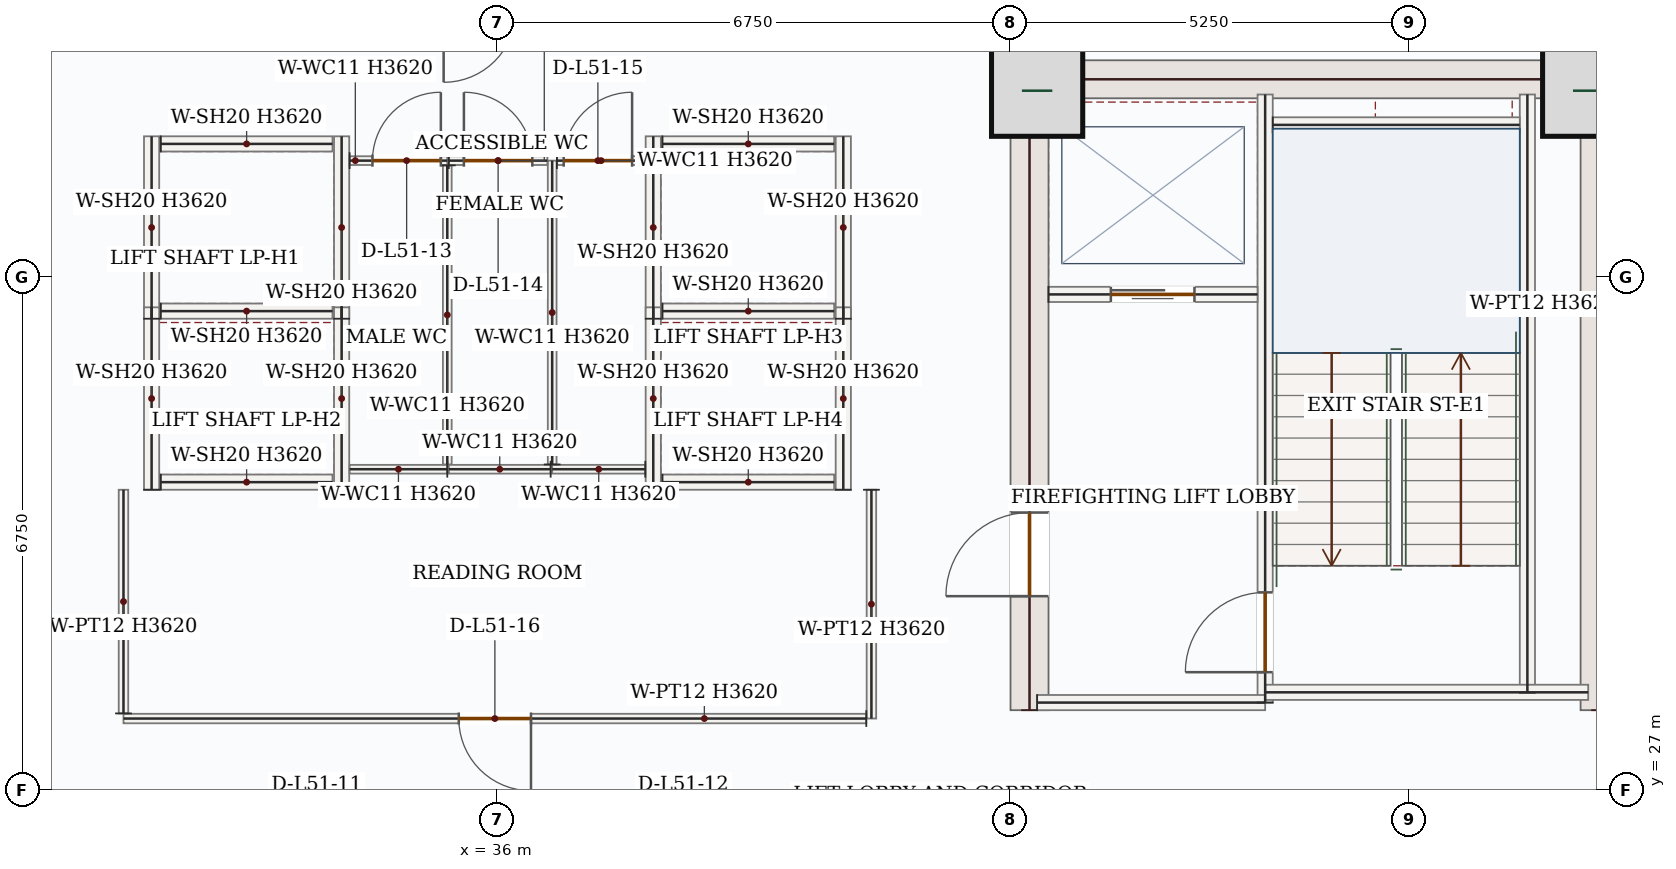
"""IFC4 building model, lengths in metres.
Left out: names, types, materials, properties, quantities, classifications, styles, units other than length and angle.
Written with IfcOpenShell. Run it as: python <this file> out.ifc"""

import sys

from ifc_helpers import new_model, si_unit, direction, frame, frame_2d, origin, origin_2d, place, context, subcontext, project, spatial, rectangle, extrude, source, transform, mapped, element, fill, save


model = new_model("IFC4")
c1 = context("Model", 3, precision=1e-05, world=origin(), true_north=direction((0.0, 1.0)))
c2 = subcontext(c1, "Body", "Model", "MODEL_VIEW")
j1 = project(units=[si_unit("LENGTHUNIT", "METRE"), si_unit("PLANEANGLEUNIT", "RADIAN")], contexts=[c1])
p1 = place(None, origin())
s1 = spatial("IfcSite", under=j1, at=p1, CompositionType="ELEMENT")
p2 = place(p1, origin())
s2 = spatial("IfcBuilding", under=s1, at=p2, CompositionType="ELEMENT")
p3 = place(p2, frame((0.0, 0.0, 217.5)))
s3 = spatial("IfcBuildingStorey", under=s2, at=p3, CompositionType="ELEMENT", Elevation=217.5)
p4 = place(p3, frame((43.0, 28.05, 0.0), z_axis=(0.0, 0.0, 1.0), x_axis=(0.0, 1.0, 0.0)))
e1 = element("IfcWall", 1, at=p4, inside=s3, PredefinedType="SHEAR", context=c2, shape_type="SweptSolid", body=[
    extrude(rectangle(XDim=8.55, YDim=0.5, at=frame_2d((4.275, 0.0))), origin(), (0.0, 0.0, 1.0), 3.62),
])
p5 = place(p4, frame((1.5, 0.0, 0.0)))
e2 = element("IfcOpeningElement", 2, at=p5, cuts=e1, PredefinedType="OPENING", context=c2, shape_type="SweptSolid", body=[
    extrude(rectangle(XDim=1.1, YDim=2.2, at=frame_2d((0.55, 1.1))), frame((0.0, 0.26, 0.0), z_axis=(0.0, -1.0, 0.0), x_axis=(1.0, 0.0, 0.0)), (0.0, 0.0, 1.0), 0.52),
])
m1 = source(origin(), c2, "Body", "SweptSolid", [
    extrude(rectangle(XDim=8.55, YDim=0.5, at=frame_2d((4.275, 0.0))), origin(), (0.0, 0.0, 1.0), 3.62),
])
p6 = place(p3, frame((50.5, 28.05, 0.0), z_axis=(0.0, 0.0, 1.0), x_axis=(0.0, 1.0, 0.0)))
e3 = element("IfcWall", 3, at=p6, inside=s3, PredefinedType="SHEAR", context=c2, shape_type="MappedRepresentation", body=[
    mapped(m1, transform((0.0, 0.0, 0.0), x_axis=(1.0, 0.0, 0.0), y_axis=(0.0, 1.0, 0.0), z_axis=(0.0, 0.0, 1.0), scale=1.0)),
])
m2 = source(origin(), c2, "Body", "SweptSolid", [
    extrude(rectangle(XDim=7.0, YDim=0.5, at=frame_2d((3.5, 0.0))), origin(), (0.0, 0.0, 1.0), 3.62),
])
p7 = place(p3, frame((43.25, 36.35, 0.0), z_axis=(0.0, 0.0, 1.0), x_axis=(1.0, 0.0, 0.0)))
e4 = element("IfcWall", 4, at=p7, inside=s3, PredefinedType="SHEAR", context=c2, shape_type="MappedRepresentation", body=[
    mapped(m2, transform((0.0, 0.0, 0.0), x_axis=(1.0, 0.0, 0.0), y_axis=(0.0, 1.0, 0.0), z_axis=(0.0, 0.0, 1.0), scale=1.0)),
])
m3 = source(origin(), c2, "Body", "SweptSolid", [
    extrude(rectangle(XDim=1.2, YDim=1.2, at=origin_2d()), origin(), (0.0, 0.0, 1.0), 3.9),
])
for number, where, z_axis, x_axis in (
    (5, (43.1, 36.2, 0.0), (0.0, 0.0, 1.0), (1.0, 0.0, 0.0)),
    (6, (50.35, 36.2, 0.0), (0.0, 0.0, 1.0), (1.0, 0.0, 0.0)),
):
    element("IfcColumn", number, at=place(p3, frame(where, z_axis=z_axis, x_axis=x_axis)), inside=s3, PredefinedType="COLUMN", context=c2, shape_type="MappedRepresentation", body=[
        mapped(m3, transform((0.0, 0.0, 0.0), x_axis=(1.0, 0.0, 0.0), y_axis=(0.0, 1.0, 0.0), z_axis=(0.0, 0.0, 1.0), scale=1.0)),
    ])
m4 = source(origin(), c2, "Body", "SweptSolid", [
    extrude(rectangle(XDim=7.87, YDim=0.2, at=frame_2d((3.935, 0.0))), origin(), (0.0, 0.0, 1.0), 3.62),
])
p8 = place(p3, frame((49.55, 28.28, 0.0), z_axis=(0.0, 0.0, 1.0), x_axis=(0.0, 1.0, 0.0)))
e7 = element("IfcWall", 7, at=p8, inside=s3, PredefinedType="SOLIDWALL", context=c2, shape_type="MappedRepresentation", body=[
    mapped(m4, transform((0.0, 0.0, 0.0), x_axis=(1.0, 0.0, 0.0), y_axis=(0.0, 1.0, 0.0), z_axis=(0.0, 0.0, 1.0), scale=1.0)),
])
p9 = place(p3, frame((46.1, 28.15, 0.0), z_axis=(0.0, 0.0, 1.0), x_axis=(0.0, 1.0, 0.0)))
e8 = element("IfcWall", 8, at=p9, inside=s3, PredefinedType="SOLIDWALL", context=c2, shape_type="SweptSolid", body=[
    extrude(rectangle(XDim=8.0, YDim=0.2, at=frame_2d((4.0, 0.0))), origin(), (0.0, 0.0, 1.0), 3.62),
])
p10 = place(p9, frame((0.4, 0.0, 0.0)))
e9 = element("IfcOpeningElement", 9, at=p10, cuts=e8, PredefinedType="OPENING", context=c2, shape_type="SweptSolid", body=[
    extrude(rectangle(XDim=1.05, YDim=2.15, at=frame_2d((0.525, 1.075))), frame((0.0, 0.11, 0.0), z_axis=(0.0, -1.0, 0.0), x_axis=(1.0, 0.0, 0.0)), (0.0, 0.0, 1.0), 0.22),
])
m5 = source(origin(), c2, "Body", "SweptSolid", [
    extrude(rectangle(XDim=3.0, YDim=0.2, at=frame_2d((1.5, 0.0))), origin(), (0.0, 0.0, 1.0), 3.62),
])
p11 = place(p3, frame((43.1, 28.15, 0.0), z_axis=(0.0, 0.0, 1.0), x_axis=(1.0, 0.0, 0.0)))
e10 = element("IfcWall", 10, at=p11, inside=s3, PredefinedType="SOLIDWALL", context=c2, shape_type="MappedRepresentation", body=[
    mapped(m5, transform((0.0, 0.0, 0.0), x_axis=(1.0, 0.0, 0.0), y_axis=(0.0, 1.0, 0.0), z_axis=(0.0, 0.0, 1.0), scale=1.0)),
])
m6 = source(origin(), c2, "Body", "SweptSolid", [
    extrude(rectangle(XDim=4.25, YDim=0.2, at=frame_2d((2.125, 0.0))), origin(), (0.0, 0.0, 1.0), 3.62),
])
p12 = place(p3, frame((46.1, 28.285, 0.0), z_axis=(0.0, 0.0, 1.0), x_axis=(1.0, 0.0, 0.0)))
e11 = element("IfcWall", 11, at=p12, inside=s3, PredefinedType="SOLIDWALL", context=c2, shape_type="MappedRepresentation", body=[
    mapped(m6, transform((0.0, 0.0, 0.0), x_axis=(1.0, 0.0, 0.0), y_axis=(0.0, 1.0, 0.0), z_axis=(0.0, 0.0, 1.0), scale=1.0)),
])
m7 = source(origin(), c2, "Body", "SweptSolid", [
    extrude(rectangle(XDim=3.25, YDim=0.2, at=frame_2d((1.625, 0.0))), origin(), (0.0, 0.0, 1.0), 3.62),
])
p13 = place(p3, frame((46.2, 35.75, 0.0), z_axis=(0.0, 0.0, 1.0), x_axis=(1.0, 0.0, 0.0)))
e12 = element("IfcWall", 12, at=p13, inside=s3, PredefinedType="SOLIDWALL", context=c2, shape_type="MappedRepresentation", body=[
    mapped(m7, transform((0.0, 0.0, 0.0), x_axis=(1.0, 0.0, 0.0), y_axis=(0.0, 1.0, 0.0), z_axis=(0.0, 0.0, 1.0), scale=1.0)),
])
p14 = place(p3, frame((43.25, 33.52, 0.0), z_axis=(0.0, 0.0, 1.0), x_axis=(1.0, 0.0, 0.0)))
e13 = element("IfcWall", 13, at=p14, inside=s3, PredefinedType="SOLIDWALL", context=c2, shape_type="SweptSolid", body=[
    extrude(rectangle(XDim=2.75, YDim=0.2, at=frame_2d((1.375, 0.0))), origin(), (0.0, 0.0, 1.0), 3.62),
])
p15 = place(p14, frame((0.82, 0.0, 0.0)))
e14 = element("IfcOpeningElement", 14, at=p15, cuts=e13, PredefinedType="OPENING", context=c2, shape_type="SweptSolid", body=[
    extrude(rectangle(XDim=1.1, YDim=2.15, at=frame_2d((0.55, 1.075))), frame((0.0, 0.11, 0.0), z_axis=(0.0, -1.0, 0.0), x_axis=(1.0, 0.0, 0.0)), (0.0, 0.0, 1.0), 0.22),
])
m8 = source(origin(), c2, "Body", "SweptSolid", [
    extrude(rectangle(XDim=2.4, YDim=0.2, at=frame_2d((1.2, 0.0))), origin(), (0.0, 0.0, 1.0), 3.62),
])
for number, where, z_axis, x_axis in (
    (15, (31.45, 33.2, 0.0), (0.0, 0.0, 1.0), (0.0, 1.0, 0.0)),
    (16, (33.95, 33.2, 0.0), (0.0, 0.0, 1.0), (0.0, 1.0, 0.0)),
):
    element("IfcWall", number, at=place(p3, frame(where, z_axis=z_axis, x_axis=x_axis)), inside=s3, PredefinedType="SOLIDWALL", context=c2, shape_type="MappedRepresentation", body=[
        mapped(m8, transform((0.0, 0.0, 0.0), x_axis=(1.0, 0.0, 0.0), y_axis=(0.0, 1.0, 0.0), z_axis=(0.0, 0.0, 1.0), scale=1.0)),
    ])
m9 = source(origin(), c2, "Body", "SweptSolid", [
    extrude(rectangle(XDim=2.26, YDim=0.2, at=frame_2d((1.13, 0.0))), origin(), (0.0, 0.0, 1.0), 3.62),
])
for number, where, z_axis, x_axis in (
    (17, (31.57, 33.3, 0.0), (0.0, 0.0, 1.0), (1.0, 0.0, 0.0)),
    (18, (31.57, 35.5, 0.0), (0.0, 0.0, 1.0), (1.0, 0.0, 0.0)),
):
    element("IfcWall", number, at=place(p3, frame(where, z_axis=z_axis, x_axis=x_axis)), inside=s3, PredefinedType="SOLIDWALL", context=c2, shape_type="MappedRepresentation", body=[
        mapped(m9, transform((0.0, 0.0, 0.0), x_axis=(1.0, 0.0, 0.0), y_axis=(0.0, 1.0, 0.0), z_axis=(0.0, 0.0, 1.0), scale=1.0)),
    ])
for number, where, z_axis, x_axis in (
    (19, (31.45, 30.95, 0.0), (0.0, 0.0, 1.0), (0.0, 1.0, 0.0)),
    (20, (33.95, 30.95, 0.0), (0.0, 0.0, 1.0), (0.0, 1.0, 0.0)),
):
    element("IfcWall", number, at=place(p3, frame(where, z_axis=z_axis, x_axis=x_axis)), inside=s3, PredefinedType="SOLIDWALL", context=c2, shape_type="MappedRepresentation", body=[
        mapped(m8, transform((0.0, 0.0, 0.0), x_axis=(1.0, 0.0, 0.0), y_axis=(0.0, 1.0, 0.0), z_axis=(0.0, 0.0, 1.0), scale=1.0)),
    ])
p16 = place(p3, frame((31.57, 31.05, 0.0), z_axis=(0.0, 0.0, 1.0), x_axis=(1.0, 0.0, 0.0)))
e21 = element("IfcWall", 21, at=p16, inside=s3, PredefinedType="SOLIDWALL", context=c2, shape_type="MappedRepresentation", body=[
    mapped(m9, transform((0.0, 0.0, 0.0), x_axis=(1.0, 0.0, 0.0), y_axis=(0.0, 1.0, 0.0), z_axis=(0.0, 0.0, 1.0), scale=1.0)),
])
for number, where, z_axis, x_axis in (
    (22, (38.05, 33.2, 0.0), (0.0, 0.0, 1.0), (0.0, 1.0, 0.0)),
    (23, (40.55, 33.2, 0.0), (0.0, 0.0, 1.0), (0.0, 1.0, 0.0)),
):
    element("IfcWall", number, at=place(p3, frame(where, z_axis=z_axis, x_axis=x_axis)), inside=s3, PredefinedType="SOLIDWALL", context=c2, shape_type="MappedRepresentation", body=[
        mapped(m8, transform((0.0, 0.0, 0.0), x_axis=(1.0, 0.0, 0.0), y_axis=(0.0, 1.0, 0.0), z_axis=(0.0, 0.0, 1.0), scale=1.0)),
    ])
for number, where, z_axis, x_axis in (
    (24, (38.17, 33.3, 0.0), (0.0, 0.0, 1.0), (1.0, 0.0, 0.0)),
    (25, (38.17, 35.5, 0.0), (0.0, 0.0, 1.0), (1.0, 0.0, 0.0)),
):
    element("IfcWall", number, at=place(p3, frame(where, z_axis=z_axis, x_axis=x_axis)), inside=s3, PredefinedType="SOLIDWALL", context=c2, shape_type="MappedRepresentation", body=[
        mapped(m9, transform((0.0, 0.0, 0.0), x_axis=(1.0, 0.0, 0.0), y_axis=(0.0, 1.0, 0.0), z_axis=(0.0, 0.0, 1.0), scale=1.0)),
    ])
for number, where, z_axis, x_axis in (
    (26, (38.05, 30.95, 0.0), (0.0, 0.0, 1.0), (0.0, 1.0, 0.0)),
    (27, (40.55, 30.95, 0.0), (0.0, 0.0, 1.0), (0.0, 1.0, 0.0)),
):
    element("IfcWall", number, at=place(p3, frame(where, z_axis=z_axis, x_axis=x_axis)), inside=s3, PredefinedType="SOLIDWALL", context=c2, shape_type="MappedRepresentation", body=[
        mapped(m8, transform((0.0, 0.0, 0.0), x_axis=(1.0, 0.0, 0.0), y_axis=(0.0, 1.0, 0.0), z_axis=(0.0, 0.0, 1.0), scale=1.0)),
    ])
p17 = place(p3, frame((38.17, 31.05, 0.0), z_axis=(0.0, 0.0, 1.0), x_axis=(1.0, 0.0, 0.0)))
e28 = element("IfcWall", 28, at=p17, inside=s3, PredefinedType="SOLIDWALL", context=c2, shape_type="MappedRepresentation", body=[
    mapped(m9, transform((0.0, 0.0, 0.0), x_axis=(1.0, 0.0, 0.0), y_axis=(0.0, 1.0, 0.0), z_axis=(0.0, 0.0, 1.0), scale=1.0)),
])
m10 = source(origin(), c2, "Body", "SweptSolid", [
    extrude(rectangle(XDim=1.225, YDim=0.115, at=frame_2d((0.613, 0.0))), origin(), (0.0, 0.0, 1.0), 3.62),
])
p18 = place(p3, frame((37.945, 31.22, 0.0), z_axis=(0.0, 0.0, 1.0), x_axis=(-1.0, 0.0, 0.0)))
e29 = element("IfcWall", 29, at=p18, inside=s3, PredefinedType="PARTITIONING", context=c2, shape_type="MappedRepresentation", body=[
    mapped(m10, transform((0.0, 0.0, 0.0), x_axis=(1.0, 0.0, 0.0), y_axis=(0.0, 1.0, 0.0), z_axis=(0.0, 0.0, 1.0), scale=1.0)),
])
m11 = source(origin(), c2, "Body", "SweptSolid", [
    extrude(rectangle(XDim=3.998, YDim=0.115, at=frame_2d((1.999, 0.0))), origin(), (0.0, 0.0, 1.0), 3.62),
])
p19 = place(p3, frame((36.72, 31.282, 0.0), z_axis=(0.0, 0.0, 1.0), x_axis=(0.0, 1.0, 0.0)))
e30 = element("IfcWall", 30, at=p19, inside=s3, PredefinedType="PARTITIONING", context=c2, shape_type="MappedRepresentation", body=[
    mapped(m11, transform((0.0, 0.0, 0.0), x_axis=(1.0, 0.0, 0.0), y_axis=(0.0, 1.0, 0.0), z_axis=(0.0, 0.0, 1.0), scale=1.0)),
])
p20 = place(p3, frame((36.782, 35.28, 0.0), z_axis=(0.0, 0.0, 1.0), x_axis=(1.0, 0.0, 0.0)))
e31 = element("IfcWall", 31, at=p20, inside=s3, PredefinedType="PARTITIONING", context=c2, shape_type="SweptSolid", body=[
    extrude(rectangle(XDim=1.163, YDim=0.115, at=frame_2d((0.581, 0.0))), origin(), (0.0, 0.0, 1.0), 3.62),
])
p21 = place(p20, frame((0.089, 0.0, 0.0)))
e32 = element("IfcOpeningElement", 32, at=p21, cuts=e31, PredefinedType="OPENING", context=c2, shape_type="SweptSolid", body=[
    extrude(rectangle(XDim=0.9, YDim=2.1, at=frame_2d((0.45, 1.05))), frame((0.0, 0.067, 0.0), z_axis=(0.0, -1.0, 0.0), x_axis=(1.0, 0.0, 0.0)), (0.0, 0.0, 1.0), 0.135),
])
m12 = source(origin(), c2, "Body", "SweptSolid", [
    extrude(rectangle(XDim=1.285, YDim=0.115, at=frame_2d((0.643, 0.0))), origin(), (0.0, 0.0, 1.0), 3.62),
])
p22 = place(p3, frame((35.34, 31.22, 0.0), z_axis=(0.0, 0.0, 1.0), x_axis=(-1.0, 0.0, 0.0)))
e33 = element("IfcWall", 33, at=p22, inside=s3, PredefinedType="PARTITIONING", context=c2, shape_type="MappedRepresentation", body=[
    mapped(m12, transform((0.0, 0.0, 0.0), x_axis=(1.0, 0.0, 0.0), y_axis=(0.0, 1.0, 0.0), z_axis=(0.0, 0.0, 1.0), scale=1.0)),
])
p23 = place(p3, frame((34.055, 35.28, 0.0), z_axis=(0.0, 0.0, 1.0), x_axis=(1.0, 0.0, 0.0)))
e34 = element("IfcWall", 34, at=p23, inside=s3, PredefinedType="PARTITIONING", context=c2, shape_type="SweptSolid", body=[
    extrude(rectangle(XDim=1.285, YDim=0.115, at=frame_2d((0.643, 0.0))), origin(), (0.0, 0.0, 1.0), 3.62),
])
p24 = place(p23, frame((0.3, 0.0, 0.0)))
e35 = element("IfcOpeningElement", 35, at=p24, cuts=e34, PredefinedType="OPENING", context=c2, shape_type="SweptSolid", body=[
    extrude(rectangle(XDim=0.9, YDim=2.1, at=frame_2d((0.45, 1.05))), frame((0.0, 0.067, 0.0), z_axis=(0.0, -1.0, 0.0), x_axis=(1.0, 0.0, 0.0)), (0.0, 0.0, 1.0), 0.135),
])
m13 = source(origin(), c2, "Body", "SweptSolid", [
    extrude(rectangle(XDim=3.935, YDim=0.115, at=frame_2d((1.968, 0.0))), origin(), (0.0, 0.0, 1.0), 3.62),
])
p25 = place(p3, frame((35.34, 35.218, 0.0), z_axis=(0.0, 0.0, 1.0), x_axis=(0.0, -1.0, 0.0)))
e36 = element("IfcWall", 36, at=p25, inside=s3, PredefinedType="PARTITIONING", context=c2, shape_type="MappedRepresentation", body=[
    mapped(m13, transform((0.0, 0.0, 0.0), x_axis=(1.0, 0.0, 0.0), y_axis=(0.0, 1.0, 0.0), z_axis=(0.0, 0.0, 1.0), scale=1.0)),
])
m14 = source(origin(), c2, "Body", "SweptSolid", [
    extrude(rectangle(XDim=1.34, YDim=0.115, at=frame_2d((0.67, 0.0))), origin(), (0.0, 0.0, 1.0), 3.62),
])
p26 = place(p3, frame((36.7, 31.22, 0.0), z_axis=(0.0, 0.0, 1.0), x_axis=(-1.0, 0.0, 0.0)))
e37 = element("IfcWall", 37, at=p26, inside=s3, PredefinedType="PARTITIONING", context=c2, shape_type="MappedRepresentation", body=[
    mapped(m14, transform((0.0, 0.0, 0.0), x_axis=(1.0, 0.0, 0.0), y_axis=(0.0, 1.0, 0.0), z_axis=(0.0, 0.0, 1.0), scale=1.0)),
])
p27 = place(p3, frame((35.36, 35.28, 0.0), z_axis=(0.0, 0.0, 1.0), x_axis=(1.0, 0.0, 0.0)))
e38 = element("IfcWall", 38, at=p27, inside=s3, PredefinedType="PARTITIONING", context=c2, shape_type="SweptSolid", body=[
    extrude(rectangle(XDim=1.297, YDim=0.115, at=frame_2d((0.649, 0.0))), origin(), (0.0, 0.0, 1.0), 3.62),
])
p28 = place(p27, frame((0.199, 0.0, 0.0)))
e39 = element("IfcOpeningElement", 39, at=p28, cuts=e38, PredefinedType="OPENING", context=c2, shape_type="SweptSolid", body=[
    extrude(rectangle(XDim=0.9, YDim=2.1, at=frame_2d((0.45, 1.05))), frame((0.0, 0.067, 0.0), z_axis=(0.0, -1.0, 0.0), x_axis=(1.0, 0.0, 0.0)), (0.0, 0.0, 1.0), 0.135),
])
m15 = source(origin(), c2, "Body", "SweptSolid", [
    extrude(rectangle(XDim=3.01, YDim=0.125, at=frame_2d((1.505, 0.0))), origin(), (0.0, 0.0, 1.0), 3.62),
])
p29 = place(p3, frame((40.92, 30.95, 0.0), z_axis=(0.0, 0.0, 1.0), x_axis=(0.0, -1.0, 0.0)))
e40 = element("IfcWall", 40, at=p29, inside=s3, PredefinedType="PARTITIONING", context=c2, shape_type="MappedRepresentation", body=[
    mapped(m15, transform((0.0, 0.0, 0.0), x_axis=(1.0, 0.0, 0.0), y_axis=(0.0, 1.0, 0.0), z_axis=(0.0, 0.0, 1.0), scale=1.0)),
])
p30 = place(p3, frame((40.853, 27.94, 0.0), z_axis=(0.0, 0.0, 1.0), x_axis=(-1.0, 0.0, 0.0)))
e41 = element("IfcWall", 41, at=p30, inside=s3, PredefinedType="PARTITIONING", context=c2, shape_type="SweptSolid", body=[
    extrude(rectangle(XDim=9.772, YDim=0.125, at=frame_2d((4.886, 0.0))), origin(), (0.0, 0.0, 1.0), 3.62),
])
p31 = place(p30, frame((4.411, 0.0, 0.0)))
e42 = element("IfcOpeningElement", 42, at=p31, cuts=e41, PredefinedType="OPENING", context=c2, shape_type="SweptSolid", body=[
    extrude(rectangle(XDim=0.95, YDim=2.15, at=frame_2d((0.475, 1.075))), frame((0.0, 0.073, 0.0), z_axis=(0.0, -1.0, 0.0), x_axis=(1.0, 0.0, 0.0)), (0.0, 0.0, 1.0), 0.145),
])
m16 = source(origin(), c2, "Body", "SweptSolid", [
    extrude(rectangle(XDim=2.942, YDim=0.125, at=frame_2d((1.471, 0.0))), origin(), (0.0, 0.0, 1.0), 3.62),
])
p32 = place(p3, frame((31.08, 28.008, 0.0), z_axis=(0.0, 0.0, 1.0), x_axis=(0.0, 1.0, 0.0)))
e43 = element("IfcWall", 43, at=p32, inside=s3, PredefinedType="PARTITIONING", context=c2, shape_type="MappedRepresentation", body=[
    mapped(m16, transform((0.0, 0.0, 0.0), x_axis=(1.0, 0.0, 0.0), y_axis=(0.0, 1.0, 0.0), z_axis=(0.0, 0.0, 1.0), scale=1.0)),
])
m17 = source(origin(), c2, "Body", "SweptSolid", [
    extrude(rectangle(XDim=1.05, YDim=2.15, at=frame_2d((0.525, 1.075))), frame((0.0, 0.025, 0.0), z_axis=(0.0, -1.0, 0.0), x_axis=(1.0, 0.0, 0.0)), (0.0, 0.0, 1.0), 0.05),
])
p33 = place(p10, origin())
e44 = element("IfcDoor", 44, at=p33, inside=s3, OperationType="SINGLE_SWING_LEFT", PredefinedType="DOOR", context=c2, shape_type="MappedRepresentation", body=[
    mapped(m17, transform((0.0, 0.0, 0.0), x_axis=(1.0, 0.0, 0.0), y_axis=(0.0, 1.0, 0.0), z_axis=(0.0, 0.0, 1.0), scale=1.0)),
])
fill(e9, e44)
m18 = source(origin(), c2, "Body", "SweptSolid", [
    extrude(rectangle(XDim=1.1, YDim=2.15, at=frame_2d((0.55, 1.075))), frame((0.0, 0.025, 0.0), z_axis=(0.0, -1.0, 0.0), x_axis=(1.0, 0.0, 0.0)), (0.0, 0.0, 1.0), 0.05),
])
p34 = place(p15, origin())
e45 = element("IfcDoor", 45, at=p34, inside=s3, OperationType="DOUBLE_DOOR_SLIDING", PredefinedType="DOOR", context=c2, shape_type="MappedRepresentation", body=[
    mapped(m18, transform((0.0, 0.0, 0.0), x_axis=(1.0, 0.0, 0.0), y_axis=(0.0, 1.0, 0.0), z_axis=(0.0, 0.0, 1.0), scale=1.0)),
])
fill(e14, e45)
m19 = source(origin(), c2, "Body", "SweptSolid", [
    extrude(rectangle(XDim=1.1, YDim=2.2, at=frame_2d((0.55, 1.1))), frame((0.0, 0.025, 0.0), z_axis=(0.0, -1.0, 0.0), x_axis=(1.0, 0.0, 0.0)), (0.0, 0.0, 1.0), 0.05),
])
p35 = place(p5, origin())
e46 = element("IfcDoor", 46, at=p35, inside=s3, OperationType="SINGLE_SWING_LEFT", PredefinedType="DOOR", context=c2, shape_type="MappedRepresentation", body=[
    mapped(m19, transform((0.0, 0.0, 0.0), x_axis=(1.0, 0.0, 0.0), y_axis=(0.0, 1.0, 0.0), z_axis=(0.0, 0.0, 1.0), scale=1.0)),
])
fill(e2, e46)
m20 = source(origin(), c2, "Body", "SweptSolid", [
    extrude(rectangle(XDim=0.9, YDim=2.1, at=frame_2d((0.45, 1.05))), frame((0.0, 0.025, 0.0), z_axis=(0.0, -1.0, 0.0), x_axis=(1.0, 0.0, 0.0)), (0.0, 0.0, 1.0), 0.05),
])
p36 = place(p24, origin())
e47 = element("IfcDoor", 47, at=p36, inside=s3, OperationType="SINGLE_SWING_RIGHT", PredefinedType="DOOR", context=c2, shape_type="MappedRepresentation", body=[
    mapped(m20, transform((0.0, 0.0, 0.0), x_axis=(1.0, 0.0, 0.0), y_axis=(0.0, 1.0, 0.0), z_axis=(0.0, 0.0, 1.0), scale=1.0)),
])
fill(e35, e47)
p37 = place(p28, origin())
e48 = element("IfcDoor", 48, at=p37, inside=s3, OperationType="SINGLE_SWING_LEFT", PredefinedType="DOOR", context=c2, shape_type="MappedRepresentation", body=[
    mapped(m20, transform((0.0, 0.0, 0.0), x_axis=(1.0, 0.0, 0.0), y_axis=(0.0, 1.0, 0.0), z_axis=(0.0, 0.0, 1.0), scale=1.0)),
])
fill(e39, e48)
p38 = place(p21, origin())
e49 = element("IfcDoor", 49, at=p38, inside=s3, OperationType="SINGLE_SWING_RIGHT", PredefinedType="DOOR", context=c2, shape_type="MappedRepresentation", body=[
    mapped(m20, transform((0.0, 0.0, 0.0), x_axis=(1.0, 0.0, 0.0), y_axis=(0.0, 1.0, 0.0), z_axis=(0.0, 0.0, 1.0), scale=1.0)),
])
fill(e32, e49)
m21 = source(origin(), c2, "Body", "SweptSolid", [
    extrude(rectangle(XDim=0.95, YDim=2.15, at=frame_2d((0.475, 1.075))), frame((0.0, 0.025, 0.0), z_axis=(0.0, -1.0, 0.0), x_axis=(1.0, 0.0, 0.0)), (0.0, 0.0, 1.0), 0.05),
])
p39 = place(p31, origin())
e50 = element("IfcDoor", 50, at=p39, inside=s3, OperationType="SINGLE_SWING_LEFT", PredefinedType="DOOR", context=c2, shape_type="MappedRepresentation", body=[
    mapped(m21, transform((0.0, 0.0, 0.0), x_axis=(1.0, 0.0, 0.0), y_axis=(0.0, 1.0, 0.0), z_axis=(0.0, 0.0, 1.0), scale=1.0)),
])
fill(e42, e50)
save(model, sys.argv[1])
